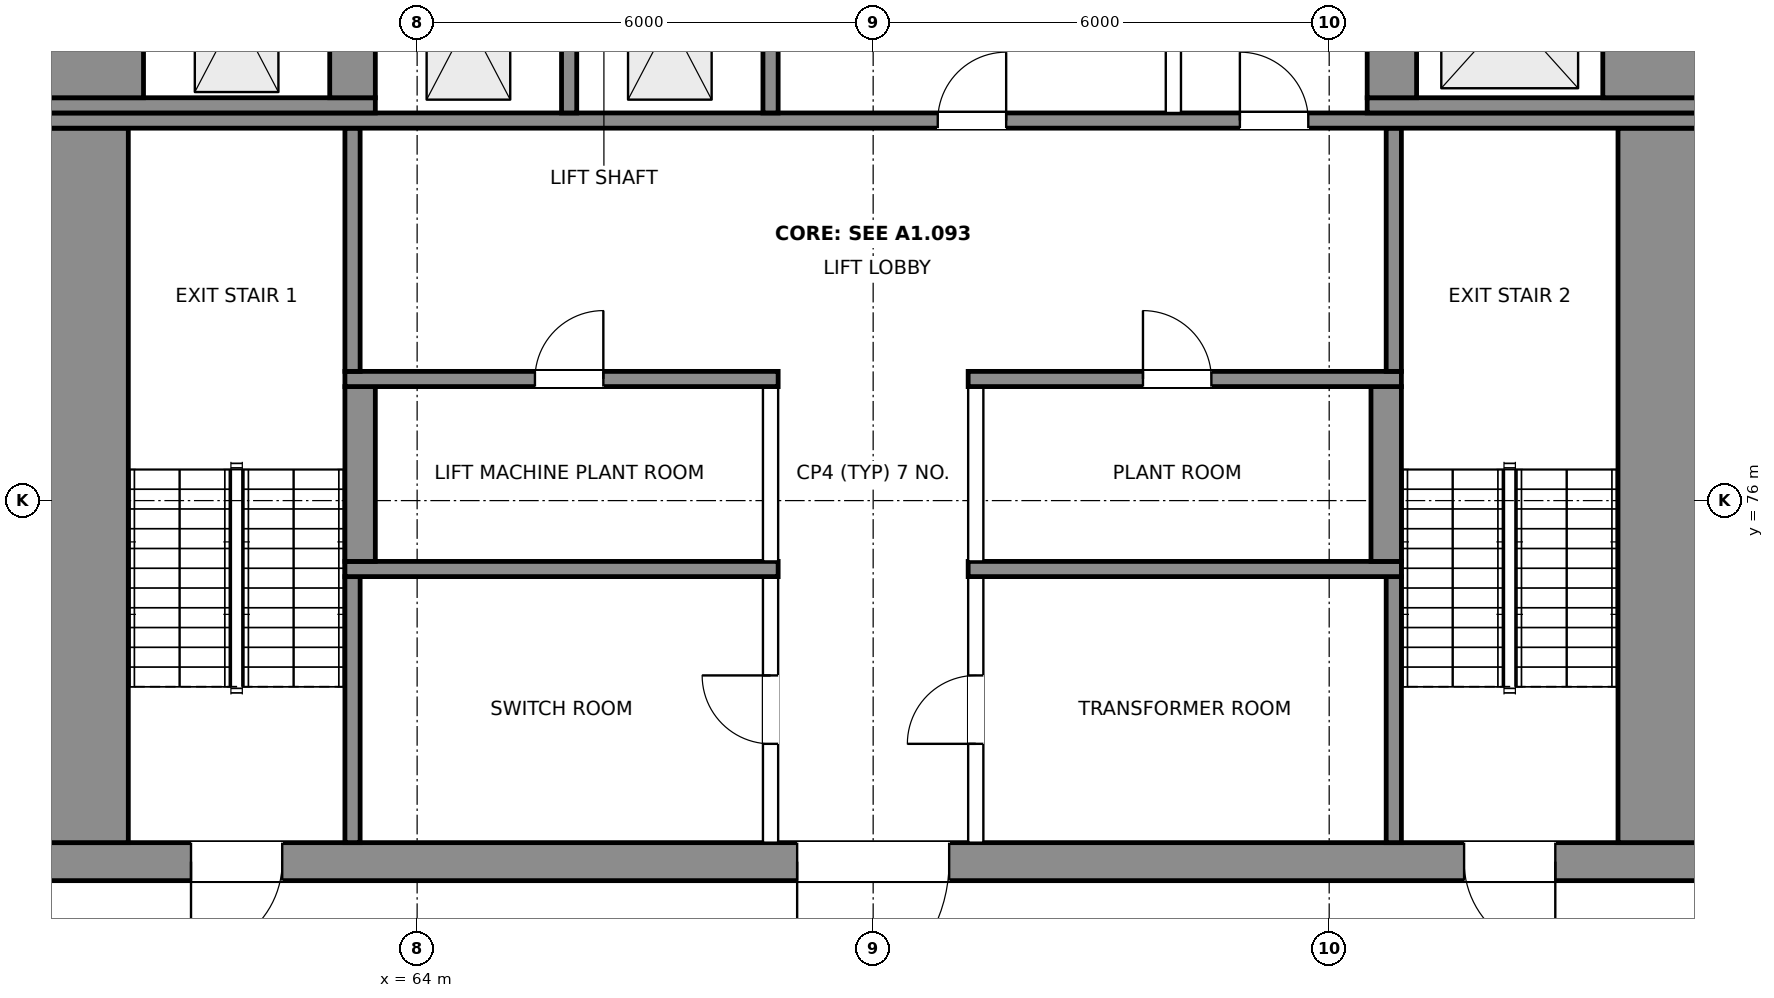
"""IFC4 building model, lengths in metres.
Left out: names, types, materials, properties, quantities, classifications, styles, units other than length and angle.
Written with IfcOpenShell. Run it as: python <this file> out.ifc"""

import sys

from ifc_helpers import new_model, si_unit, direction, frame, frame_2d, origin, place, context, subcontext, project, spatial, rectangle, extrude, element, fill, save


model = new_model("IFC4")
c1 = context("Model", 3, precision=1e-05, world=origin(), true_north=direction((0.0, 1.0)))
c2 = subcontext(c1, "Body", "Model", "MODEL_VIEW")
j1 = project(units=[si_unit("LENGTHUNIT", "METRE"), si_unit("PLANEANGLEUNIT", "RADIAN")], contexts=[c1])
p1 = place(None, origin())
s1 = spatial("IfcSite", under=j1, at=p1, CompositionType="ELEMENT")
p2 = place(p1, origin())
s2 = spatial("IfcBuilding", under=s1, at=p2, CompositionType="ELEMENT")
p3 = place(p2, frame((0.0, 0.0, 337.7)))
s3 = spatial("IfcBuildingStorey", under=s2, at=p3, CompositionType="ELEMENT", Elevation=337.7)
p4 = place(p3, frame((59.0, 71.25, 0.0), z_axis=(0.0, 0.0, 1.0), x_axis=(1.0, 0.0, 0.0)))
e1 = element("IfcWall", 1, at=p4, inside=s3, PredefinedType="SHEAR", context=c2, shape_type="SweptSolid", body=[
    extrude(rectangle(XDim=22.0, YDim=0.5, at=frame_2d((11.0, 0.0))), origin(), (0.0, 0.0, 1.0), 4.5),
])
p5 = place(p4, frame((2.025, 0.0, 0.0)))
e2 = element("IfcOpeningElement", 2, at=p5, cuts=e1, PredefinedType="OPENING", context=c2, shape_type="SweptSolid", body=[
    extrude(rectangle(XDim=1.2, YDim=2.1, at=frame_2d((0.6, 1.05))), frame((0.0, 0.26, 0.0), z_axis=(0.0, -1.0, 0.0), x_axis=(1.0, 0.0, 0.0)), (0.0, 0.0, 1.0), 0.52),
])
p6 = place(p4, frame((18.775, 0.0, 0.0)))
e3 = element("IfcOpeningElement", 3, at=p6, cuts=e1, PredefinedType="OPENING", context=c2, shape_type="SweptSolid", body=[
    extrude(rectangle(XDim=1.2, YDim=2.1, at=frame_2d((0.6, 1.05))), frame((0.0, 0.26, 0.0), z_axis=(0.0, -1.0, 0.0), x_axis=(1.0, 0.0, 0.0)), (0.0, 0.0, 1.0), 0.52),
])
p7 = place(p4, frame((10.0, 0.0, 0.0)))
e4 = element("IfcOpeningElement", 4, at=p7, cuts=e1, PredefinedType="OPENING", context=c2, shape_type="SweptSolid", body=[
    extrude(rectangle(XDim=2.0, YDim=2.1, at=frame_2d((1.0, 1.05))), frame((0.0, 0.26, 0.0), z_axis=(0.0, -1.0, 0.0), x_axis=(1.0, 0.0, 0.0)), (0.0, 0.0, 1.0), 0.52),
])
p8 = place(p3, frame((59.6, 71.5, 0.0), z_axis=(0.0, 0.0, 1.0), x_axis=(0.0, 1.0, 0.0)))
e5 = element("IfcWall", 5, at=p8, inside=s3, PredefinedType="SHEAR", context=c2, shape_type="SweptSolid", body=[
    extrude(rectangle(XDim=9.4, YDim=1.2, at=frame_2d((4.7, 0.0))), origin(), (0.0, 0.0, 1.0), 4.5),
])
p9 = place(p3, frame((63.15, 71.5, 0.0), z_axis=(0.0, 0.0, 1.0), x_axis=(0.0, 1.0, 0.0)))
e6 = element("IfcWall", 6, at=p9, inside=s3, PredefinedType="SHEAR", context=c2, shape_type="SweptSolid", body=[
    extrude(rectangle(XDim=3.5, YDim=0.2, at=frame_2d((1.75, 0.0))), origin(), (0.0, 0.0, 1.0), 4.5),
])
p10 = place(p3, frame((68.65, 71.5, 0.0), z_axis=(0.0, 0.0, 1.0), x_axis=(0.0, 1.0, 0.0)))
e7 = element("IfcWall", 7, at=p10, inside=s3, PredefinedType="PARTITIONING", context=c2, shape_type="SweptSolid", body=[
    extrude(rectangle(XDim=3.5, YDim=0.2, at=frame_2d((1.75, 0.0))), origin(), (0.0, 0.0, 1.0), 4.2),
])
p11 = place(p10, frame((1.3, 0.0, 0.0)))
e8 = element("IfcOpeningElement", 8, at=p11, cuts=e7, PredefinedType="OPENING", context=c2, shape_type="SweptSolid", body=[
    extrude(rectangle(XDim=0.9, YDim=2.1, at=frame_2d((0.45, 1.05))), frame((0.0, 0.11, 0.0), z_axis=(0.0, -1.0, 0.0), x_axis=(1.0, 0.0, 0.0)), (0.0, 0.0, 1.0), 0.22),
])
p12 = place(p3, frame((71.35, 71.5, 0.0), z_axis=(0.0, 0.0, 1.0), x_axis=(0.0, 1.0, 0.0)))
e9 = element("IfcWall", 9, at=p12, inside=s3, PredefinedType="PARTITIONING", context=c2, shape_type="SweptSolid", body=[
    extrude(rectangle(XDim=3.5, YDim=0.2, at=frame_2d((1.75, 0.0))), origin(), (0.0, 0.0, 1.0), 4.2),
])
p13 = place(p12, frame((1.3, 0.0, 0.0)))
e10 = element("IfcOpeningElement", 10, at=p13, cuts=e9, PredefinedType="OPENING", context=c2, shape_type="SweptSolid", body=[
    extrude(rectangle(XDim=0.9, YDim=2.1, at=frame_2d((0.45, 1.05))), frame((0.0, 0.11, 0.0), z_axis=(0.0, -1.0, 0.0), x_axis=(1.0, 0.0, 0.0)), (0.0, 0.0, 1.0), 0.22),
])
p14 = place(p3, frame((76.85, 71.5, 0.0), z_axis=(0.0, 0.0, 1.0), x_axis=(0.0, 1.0, 0.0)))
e11 = element("IfcWall", 11, at=p14, inside=s3, PredefinedType="SHEAR", context=c2, shape_type="SweptSolid", body=[
    extrude(rectangle(XDim=3.5, YDim=0.2, at=frame_2d((1.75, 0.0))), origin(), (0.0, 0.0, 1.0), 4.5),
])
p15 = place(p3, frame((80.4, 71.5, 0.0), z_axis=(0.0, 0.0, 1.0), x_axis=(0.0, 1.0, 0.0)))
e12 = element("IfcWall", 12, at=p15, inside=s3, PredefinedType="SHEAR", context=c2, shape_type="SweptSolid", body=[
    extrude(rectangle(XDim=9.4, YDim=1.2, at=frame_2d((4.7, 0.0))), origin(), (0.0, 0.0, 1.0), 4.5),
])
for number, where, z_axis, x_axis in (
    (13, (63.05, 75.1, 0.0), (0.0, 0.0, 1.0), (1.0, 0.0, 0.0)),
    (14, (71.25, 75.1, 0.0), (0.0, 0.0, 1.0), (1.0, 0.0, 0.0)),
):
    element("IfcWall", number, at=place(p3, frame(where, z_axis=z_axis, x_axis=x_axis)), inside=s3, PredefinedType="SHEAR", context=c2, shape_type="SweptSolid", body=[
        extrude(rectangle(XDim=5.7, YDim=0.2, at=frame_2d((2.85, 0.0))), origin(), (0.0, 0.0, 1.0), 4.5),
    ])
p16 = place(p3, frame((63.25, 75.2, 0.0), z_axis=(0.0, 0.0, 1.0), x_axis=(0.0, 1.0, 0.0)))
e15 = element("IfcWall", 15, at=p16, inside=s3, PredefinedType="SHEAR", context=c2, shape_type="SweptSolid", body=[
    extrude(rectangle(XDim=2.3, YDim=0.4, at=frame_2d((1.15, 0.0))), origin(), (0.0, 0.0, 1.0), 4.5),
])
for number, where, z_axis, x_axis in (
    (16, (68.65, 75.2, 0.0), (0.0, 0.0, 1.0), (0.0, 1.0, 0.0)),
    (17, (71.35, 75.2, 0.0), (0.0, 0.0, 1.0), (0.0, 1.0, 0.0)),
):
    element("IfcWall", number, at=place(p3, frame(where, z_axis=z_axis, x_axis=x_axis)), inside=s3, PredefinedType="PARTITIONING", context=c2, shape_type="SweptSolid", body=[
        extrude(rectangle(XDim=2.3, YDim=0.2, at=frame_2d((1.15, 0.0))), origin(), (0.0, 0.0, 1.0), 4.2),
    ])
p17 = place(p3, frame((76.75, 75.2, 0.0), z_axis=(0.0, 0.0, 1.0), x_axis=(0.0, 1.0, 0.0)))
e18 = element("IfcWall", 18, at=p17, inside=s3, PredefinedType="SHEAR", context=c2, shape_type="SweptSolid", body=[
    extrude(rectangle(XDim=2.3, YDim=0.4, at=frame_2d((1.15, 0.0))), origin(), (0.0, 0.0, 1.0), 4.5),
])
p18 = place(p3, frame((63.05, 77.6, 0.0), z_axis=(0.0, 0.0, 1.0), x_axis=(1.0, 0.0, 0.0)))
e19 = element("IfcWall", 19, at=p18, inside=s3, PredefinedType="SHEAR", context=c2, shape_type="SweptSolid", body=[
    extrude(rectangle(XDim=5.7, YDim=0.2, at=frame_2d((2.85, 0.0))), origin(), (0.0, 0.0, 1.0), 4.5),
])
p19 = place(p18, frame((2.5, 0.0, 0.0)))
e20 = element("IfcOpeningElement", 20, at=p19, cuts=e19, PredefinedType="OPENING", context=c2, shape_type="SweptSolid", body=[
    extrude(rectangle(XDim=0.9, YDim=2.1, at=frame_2d((0.45, 1.05))), frame((0.0, 0.11, 0.0), z_axis=(0.0, -1.0, 0.0), x_axis=(1.0, 0.0, 0.0)), (0.0, 0.0, 1.0), 0.22),
])
p20 = place(p3, frame((71.25, 77.6, 0.0), z_axis=(0.0, 0.0, 1.0), x_axis=(1.0, 0.0, 0.0)))
e21 = element("IfcWall", 21, at=p20, inside=s3, PredefinedType="SHEAR", context=c2, shape_type="SweptSolid", body=[
    extrude(rectangle(XDim=5.7, YDim=0.2, at=frame_2d((2.85, 0.0))), origin(), (0.0, 0.0, 1.0), 4.5),
])
p21 = place(p20, frame((2.3, 0.0, 0.0)))
e22 = element("IfcOpeningElement", 22, at=p21, cuts=e21, PredefinedType="OPENING", context=c2, shape_type="SweptSolid", body=[
    extrude(rectangle(XDim=0.9, YDim=2.1, at=frame_2d((0.45, 1.05))), frame((0.0, 0.11, 0.0), z_axis=(0.0, -1.0, 0.0), x_axis=(1.0, 0.0, 0.0)), (0.0, 0.0, 1.0), 0.22),
])
for number, where, z_axis, x_axis in (
    (23, (63.15, 77.7, 0.0), (0.0, 0.0, 1.0), (0.0, 1.0, 0.0)),
    (24, (76.85, 77.7, 0.0), (0.0, 0.0, 1.0), (0.0, 1.0, 0.0)),
):
    element("IfcWall", number, at=place(p3, frame(where, z_axis=z_axis, x_axis=x_axis)), inside=s3, PredefinedType="SHEAR", context=c2, shape_type="SweptSolid", body=[
        extrude(rectangle(XDim=3.2, YDim=0.2, at=frame_2d((1.6, 0.0))), origin(), (0.0, 0.0, 1.0), 4.5),
    ])
p22 = place(p3, frame((59.0, 81.0, 0.0), z_axis=(0.0, 0.0, 1.0), x_axis=(1.0, 0.0, 0.0)))
e25 = element("IfcWall", 25, at=p22, inside=s3, PredefinedType="SHEAR", context=c2, shape_type="SweptSolid", body=[
    extrude(rectangle(XDim=22.0, YDim=0.2, at=frame_2d((11.0, 0.0))), origin(), (0.0, 0.0, 1.0), 4.5),
])
p23 = place(p22, frame((11.85, 0.0, 0.0)))
e26 = element("IfcOpeningElement", 26, at=p23, cuts=e25, PredefinedType="OPENING", context=c2, shape_type="SweptSolid", body=[
    extrude(rectangle(XDim=0.9, YDim=2.1, at=frame_2d((0.45, 1.05))), frame((0.0, 0.11, 0.0), z_axis=(0.0, -1.0, 0.0), x_axis=(1.0, 0.0, 0.0)), (0.0, 0.0, 1.0), 0.22),
])
p24 = place(p22, frame((15.825, 0.0, 0.0)))
e27 = element("IfcOpeningElement", 27, at=p24, cuts=e25, PredefinedType="OPENING", context=c2, shape_type="SweptSolid", body=[
    extrude(rectangle(XDim=0.9, YDim=2.1, at=frame_2d((0.45, 1.05))), frame((0.0, 0.11, 0.0), z_axis=(0.0, -1.0, 0.0), x_axis=(1.0, 0.0, 0.0)), (0.0, 0.0, 1.0), 0.22),
])
p25 = place(p3, frame((59.0, 81.2, 0.0), z_axis=(0.0, 0.0, 1.0), x_axis=(1.0, 0.0, 0.0)))
e28 = element("IfcWall", 28, at=p25, inside=s3, PredefinedType="SHEAR", context=c2, shape_type="SweptSolid", body=[
    extrude(rectangle(XDim=4.45, YDim=0.2, at=frame_2d((2.225, 0.0))), origin(), (0.0, 0.0, 1.0), 4.5),
])
for number, where, z_axis, x_axis in (
    (29, (66.0, 81.1, 0.0), (0.0, 0.0, 1.0), (0.0, 1.0, 0.0)),
    (30, (68.65, 81.1, 0.0), (0.0, 0.0, 1.0), (0.0, 1.0, 0.0)),
):
    element("IfcWall", number, at=place(p3, frame(where, z_axis=z_axis, x_axis=x_axis)), inside=s3, PredefinedType="SHEAR", context=c2, shape_type="SweptSolid", body=[
        extrude(rectangle(XDim=2.45, YDim=0.2, at=frame_2d((1.225, 0.0))), origin(), (0.0, 0.0, 1.0), 4.5),
    ])
p26 = place(p3, frame((73.95, 81.1, 0.0), z_axis=(0.0, 0.0, 1.0), x_axis=(0.0, 1.0, 0.0)))
e31 = element("IfcWall", 31, at=p26, inside=s3, PredefinedType="PARTITIONING", context=c2, shape_type="SweptSolid", body=[
    extrude(rectangle(XDim=2.45, YDim=0.2, at=frame_2d((1.225, 0.0))), origin(), (0.0, 0.0, 1.0), 4.2),
])
p27 = place(p3, frame((76.5, 81.2, 0.0), z_axis=(0.0, 0.0, 1.0), x_axis=(1.0, 0.0, 0.0)))
e32 = element("IfcWall", 32, at=p27, inside=s3, PredefinedType="SHEAR", context=c2, shape_type="SweptSolid", body=[
    extrude(rectangle(XDim=4.5, YDim=0.2, at=frame_2d((2.25, 0.0))), origin(), (0.0, 0.0, 1.0), 4.5),
])
p28 = place(p3, frame((59.7, 81.3, 0.0), z_axis=(0.0, 0.0, 1.0), x_axis=(0.0, 1.0, 0.0)))
e33 = element("IfcWall", 33, at=p28, inside=s3, PredefinedType="SHEAR", context=c2, shape_type="SweptSolid", body=[
    extrude(rectangle(XDim=2.25, YDim=1.4, at=frame_2d((1.125, 0.0))), origin(), (0.0, 0.0, 1.0), 4.5),
])
p29 = place(p3, frame((63.15, 81.3, 0.0), z_axis=(0.0, 0.0, 1.0), x_axis=(0.0, 1.0, 0.0)))
e34 = element("IfcWall", 34, at=p29, inside=s3, PredefinedType="SHEAR", context=c2, shape_type="SweptSolid", body=[
    extrude(rectangle(XDim=2.25, YDim=0.6, at=frame_2d((1.125, 0.0))), origin(), (0.0, 0.0, 1.0), 4.5),
])
p30 = place(p3, frame((76.825, 81.3, 0.0), z_axis=(0.0, 0.0, 1.0), x_axis=(0.0, 1.0, 0.0)))
e35 = element("IfcWall", 35, at=p30, inside=s3, PredefinedType="SHEAR", context=c2, shape_type="SweptSolid", body=[
    extrude(rectangle(XDim=2.25, YDim=0.65, at=frame_2d((1.125, 0.0))), origin(), (0.0, 0.0, 1.0), 4.5),
])
p31 = place(p3, frame((80.3, 81.3, 0.0), z_axis=(0.0, 0.0, 1.0), x_axis=(0.0, 1.0, 0.0)))
e36 = element("IfcWall", 36, at=p31, inside=s3, PredefinedType="SHEAR", context=c2, shape_type="SweptSolid", body=[
    extrude(rectangle(XDim=2.25, YDim=1.4, at=frame_2d((1.125, 0.0))), origin(), (0.0, 0.0, 1.0), 4.5),
])
p32 = place(p5, frame((1.2, 0.0, 0.0), z_axis=(0.0, 0.0, 1.0), x_axis=(-1.0, 0.0, 0.0)))
e37 = element("IfcDoor", 37, at=p32, inside=s3, OperationType="SINGLE_SWING_RIGHT", PredefinedType="DOOR", context=c2, shape_type="SweptSolid", body=[
    extrude(rectangle(XDim=1.2, YDim=2.1, at=frame_2d((0.6, 1.05))), frame((0.0, 0.025, 0.0), z_axis=(0.0, -1.0, 0.0), x_axis=(1.0, 0.0, 0.0)), (0.0, 0.0, 1.0), 0.05),
])
fill(e2, e37)
p33 = place(p6, frame((1.2, 0.0, 0.0), z_axis=(0.0, 0.0, 1.0), x_axis=(-1.0, 0.0, 0.0)))
e38 = element("IfcDoor", 38, at=p33, inside=s3, OperationType="SINGLE_SWING_LEFT", PredefinedType="DOOR", context=c2, shape_type="SweptSolid", body=[
    extrude(rectangle(XDim=1.2, YDim=2.1, at=frame_2d((0.6, 1.05))), frame((0.0, 0.025, 0.0), z_axis=(0.0, -1.0, 0.0), x_axis=(1.0, 0.0, 0.0)), (0.0, 0.0, 1.0), 0.05),
])
fill(e3, e38)
p34 = place(p7, frame((2.0, 0.0, 0.0), z_axis=(0.0, 0.0, 1.0), x_axis=(-1.0, 0.0, 0.0)))
e39 = element("IfcDoor", 39, at=p34, inside=s3, OperationType="DOUBLE_DOOR_SINGLE_SWING", PredefinedType="DOOR", context=c2, shape_type="SweptSolid", body=[
    extrude(rectangle(XDim=2.0, YDim=2.1, at=frame_2d((1.0, 1.05))), frame((0.0, 0.025, 0.0), z_axis=(0.0, -1.0, 0.0), x_axis=(1.0, 0.0, 0.0)), (0.0, 0.0, 1.0), 0.05),
])
fill(e4, e39)
p35 = place(p11, origin())
e40 = element("IfcDoor", 40, at=p35, inside=s3, OperationType="SINGLE_SWING_RIGHT", PredefinedType="DOOR", context=c2, shape_type="SweptSolid", body=[
    extrude(rectangle(XDim=0.9, YDim=2.1, at=frame_2d((0.45, 1.05))), frame((0.0, 0.025, 0.0), z_axis=(0.0, -1.0, 0.0), x_axis=(1.0, 0.0, 0.0)), (0.0, 0.0, 1.0), 0.05),
])
fill(e8, e40)
p36 = place(p13, origin())
e41 = element("IfcDoor", 41, at=p36, inside=s3, OperationType="SINGLE_SWING_LEFT", PredefinedType="DOOR", context=c2, shape_type="SweptSolid", body=[
    extrude(rectangle(XDim=0.9, YDim=2.1, at=frame_2d((0.45, 1.05))), frame((0.0, 0.025, 0.0), z_axis=(0.0, -1.0, 0.0), x_axis=(1.0, 0.0, 0.0)), (0.0, 0.0, 1.0), 0.05),
])
fill(e10, e41)
p37 = place(p19, origin())
e42 = element("IfcDoor", 42, at=p37, inside=s3, OperationType="SINGLE_SWING_RIGHT", PredefinedType="DOOR", context=c2, shape_type="SweptSolid", body=[
    extrude(rectangle(XDim=0.9, YDim=2.1, at=frame_2d((0.45, 1.05))), frame((0.0, 0.025, 0.0), z_axis=(0.0, -1.0, 0.0), x_axis=(1.0, 0.0, 0.0)), (0.0, 0.0, 1.0), 0.05),
])
fill(e20, e42)
p38 = place(p21, origin())
e43 = element("IfcDoor", 43, at=p38, inside=s3, OperationType="SINGLE_SWING_LEFT", PredefinedType="DOOR", context=c2, shape_type="SweptSolid", body=[
    extrude(rectangle(XDim=0.9, YDim=2.1, at=frame_2d((0.45, 1.05))), frame((0.0, 0.025, 0.0), z_axis=(0.0, -1.0, 0.0), x_axis=(1.0, 0.0, 0.0)), (0.0, 0.0, 1.0), 0.05),
])
fill(e22, e43)
p39 = place(p23, origin())
e44 = element("IfcDoor", 44, at=p39, inside=s3, OperationType="SINGLE_SWING_RIGHT", PredefinedType="DOOR", context=c2, shape_type="SweptSolid", body=[
    extrude(rectangle(XDim=0.9, YDim=2.1, at=frame_2d((0.45, 1.05))), frame((0.0, 0.025, 0.0), z_axis=(0.0, -1.0, 0.0), x_axis=(1.0, 0.0, 0.0)), (0.0, 0.0, 1.0), 0.05),
])
fill(e26, e44)
p40 = place(p24, origin())
e45 = element("IfcDoor", 45, at=p40, inside=s3, OperationType="SINGLE_SWING_LEFT", PredefinedType="DOOR", context=c2, shape_type="SweptSolid", body=[
    extrude(rectangle(XDim=0.9, YDim=2.1, at=frame_2d((0.45, 1.05))), frame((0.0, 0.025, 0.0), z_axis=(0.0, -1.0, 0.0), x_axis=(1.0, 0.0, 0.0)), (0.0, 0.0, 1.0), 0.05),
])
fill(e27, e45)
save(model, sys.argv[1])
